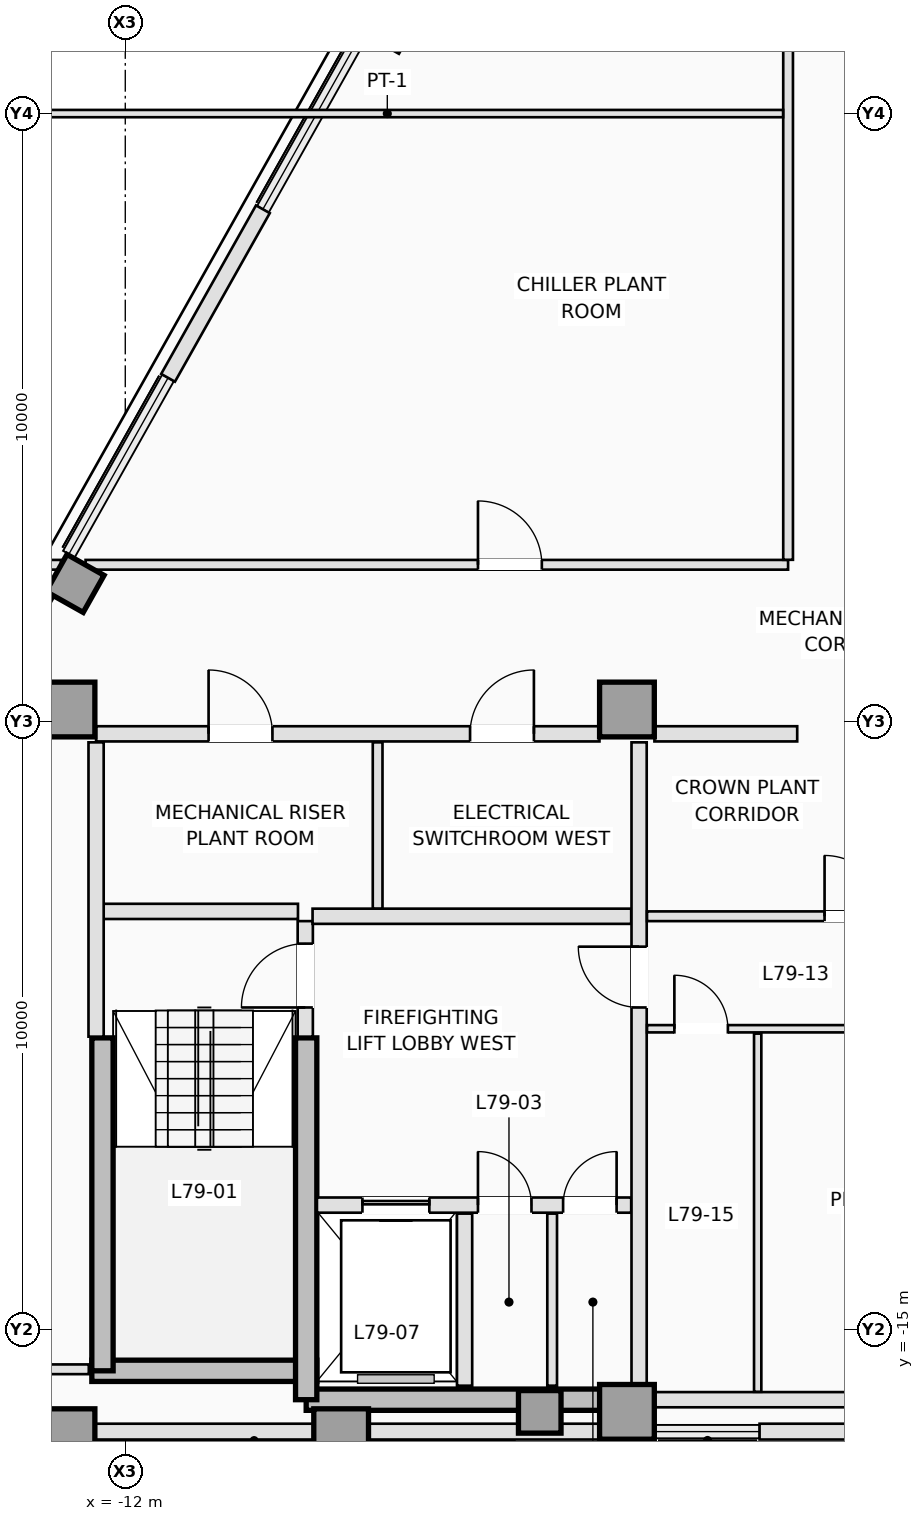
"""IFC4 building model, lengths in metres.
Left out: names, types, materials, properties, quantities, classifications, styles, units other than length and angle.
Written with IfcOpenShell. Run it as: python <this file> out.ifc"""

import sys

from ifc_helpers import new_model, si_unit, direction, frame, frame_2d, origin, origin_2d, place, context, subcontext, project, spatial, rectangle, extrude, element, fill, save


model = new_model("IFC4")
c1 = context("Model", 3, precision=1e-05, world=origin(), true_north=direction((0.0, 1.0)))
c2 = subcontext(c1, "Body", "Model", "MODEL_VIEW")
j1 = project(units=[si_unit("LENGTHUNIT", "METRE"), si_unit("PLANEANGLEUNIT", "RADIAN")], contexts=[c1])
p1 = place(None, origin())
s1 = spatial("IfcSite", under=j1, at=p1, CompositionType="ELEMENT")
p2 = place(p1, origin())
s2 = spatial("IfcBuilding", under=s1, at=p2, CompositionType="ELEMENT")
p3 = place(p2, frame((0.0, 0.0, 283.7)))
s3 = spatial("IfcBuildingStorey", under=s2, at=p3, CompositionType="ELEMENT", Elevation=283.7)
p4 = place(p3, frame((-12.55, -15.675, 0.0), z_axis=(0.0, 0.0, 1.0), x_axis=(1.0, 0.0, 0.0)))
e1 = element("IfcWall", 1, at=p4, inside=s3, PredefinedType="SHEAR", context=c2, shape_type="SweptSolid", body=[
    extrude(rectangle(XDim=3.7, YDim=0.35, at=frame_2d((1.85, 0.0))), origin(), (0.0, 0.0, 1.0), 3.2),
])
p5 = place(p3, frame((-9.025, -16.15, 0.0), z_axis=(0.0, 0.0, 1.0), x_axis=(1.0, 0.0, 0.0)))
e2 = element("IfcWall", 2, at=p5, inside=s3, PredefinedType="SHEAR", context=c2, shape_type="SweptSolid", body=[
    extrude(rectangle(XDim=5.275, YDim=0.35, at=frame_2d((2.637, 0.0))), origin(), (0.0, 0.0, 1.0), 3.2),
])
p6 = place(p3, frame((-12.375, -15.675, 0.0), z_axis=(0.0, 0.0, 1.0), x_axis=(0.0, 1.0, 0.0)))
e3 = element("IfcWall", 3, at=p6, inside=s3, PredefinedType="SHEAR", context=c2, shape_type="SweptSolid", body=[
    extrude(rectangle(XDim=5.475, YDim=0.35, at=frame_2d((2.738, 0.0))), origin(), (0.0, 0.0, 1.0), 3.2),
])
p7 = place(p3, frame((-9.025, -16.15, 0.0), z_axis=(0.0, 0.0, 1.0), x_axis=(0.0, 1.0, 0.0)))
e4 = element("IfcWall", 4, at=p7, inside=s3, PredefinedType="SHEAR", context=c2, shape_type="SweptSolid", body=[
    extrude(rectangle(XDim=5.95, YDim=0.35, at=frame_2d((2.975, 0.0))), origin(), (0.0, 0.0, 1.0), 3.2),
])
for number, where, z_axis, x_axis in (
    (5, (-12.95, -16.75, 0.0), (0.0, 0.0, 1.0), (1.0, 0.0, 0.0)),
    (6, (-8.45, -16.75, 0.0), (0.0, 0.0, 1.0), (1.0, 0.0, 0.0)),
    (7, (-3.75, -16.35, 0.0), (0.0, 0.0, 1.0), (1.0, 0.0, 0.0)),
    (8, (-12.95, -4.8, 0.0), (0.0, 0.0, 1.0), (1.0, 0.0, 0.0)),
    (9, (-3.75, -4.8, 0.0), (0.0, 0.0, 1.0), (1.0, 0.0, 0.0)),
):
    element("IfcColumn", number, at=place(p3, frame(where, z_axis=z_axis, x_axis=x_axis)), inside=s3, PredefinedType="COLUMN", context=c2, shape_type="SweptSolid", body=[
        extrude(rectangle(XDim=0.9, YDim=0.9, at=origin_2d()), origin(), (0.0, 0.0, 1.0), 3.2),
    ])
for number, where, z_axis, x_axis in (
    (10, (-5.184, -16.35, 0.0), (0.0, 0.0, 1.0), (0.0, 1.0, 0.0)),
    (11, (-12.825, -2.727, 0.0), (0.0, 0.0, 1.0), (-0.872, 0.49, 0.0)),
):
    element("IfcColumn", number, at=place(p3, frame(where, z_axis=z_axis, x_axis=x_axis)), inside=s3, PredefinedType="COLUMN", context=c2, shape_type="SweptSolid", body=[
        extrude(rectangle(XDim=0.7, YDim=0.7, at=origin_2d()), origin(), (0.0, 0.0, 1.0), 3.2),
    ])
p8 = place(p3, frame((-4.22, -16.675, 0.0), z_axis=(0.0, 0.0, 1.0), x_axis=(-1.0, 0.0, 0.0)))
e12 = element("IfcWall", 12, at=p8, inside=s3, PredefinedType="STANDARD", context=c2, shape_type="SweptSolid", body=[
    extrude(rectangle(XDim=11.323, YDim=0.26, at=frame_2d((5.661, 0.0))), origin(), (0.0, 0.0, 1.0), 2.234),
])
p9 = place(p3, frame((1.569, -16.675, 0.0), z_axis=(0.0, 0.0, 1.0), x_axis=(-1.0, 0.0, 0.0)))
e13 = element("IfcWall", 13, at=p9, inside=s3, PredefinedType="STANDARD", context=c2, shape_type="SweptSolid", body=[
    extrude(rectangle(XDim=3.138, YDim=0.26, at=frame_2d((1.569, 0.0))), origin(), (0.0, 0.0, 1.0), 2.95),
])
p10 = place(p3, frame((-18.292, -11.781, 0.0), z_axis=(0.0, 0.0, 1.0), x_axis=(0.490270316201, 0.871570431492, 0.0)))
e14 = element("IfcWall", 14, at=p10, inside=s3, PredefinedType="STANDARD", context=c2, shape_type="SweptSolid", body=[
    extrude(rectangle(XDim=10.216, YDim=0.26, at=frame_2d((5.108, 0.0))), origin(), (0.0, 0.0, 1.0), 2.95),
])
p11 = place(p3, frame((-11.296, 0.655, 0.0), z_axis=(0.0, 0.0, 1.0), x_axis=(0.490283106586, 0.871563236602, 0.0)))
e15 = element("IfcWall", 15, at=p11, inside=s3, PredefinedType="STANDARD", context=c2, shape_type="SweptSolid", body=[
    extrude(rectangle(XDim=3.18, YDim=0.26, at=frame_2d((1.59, 0.0))), origin(), (0.0, 0.0, 1.0), 2.95),
])
p12 = place(p3, frame((-9.04, -10.18, 0.0), z_axis=(0.0, 0.0, 1.0), x_axis=(0.0, 1.0, 0.0)))
e16 = element("IfcWall", 16, at=p12, inside=s3, PredefinedType="PARTITIONING", context=c2, shape_type="SweptSolid", body=[
    extrude(rectangle(XDim=1.9, YDim=0.25, at=frame_2d((0.95, 0.0))), origin(), (0.0, 0.0, 1.0), 2.95),
])
p13 = place(p12, frame((0.48, 0.0, 0.0)))
e17 = element("IfcOpeningElement", 17, at=p13, cuts=e16, PredefinedType="OPENING", context=c2, shape_type="SweptSolid", body=[
    extrude(rectangle(XDim=1.05, YDim=2.15, at=frame_2d((0.525, 1.075))), frame((0.0, 0.135, 0.0), z_axis=(0.0, -1.0, 0.0), x_axis=(1.0, 0.0, 0.0)), (0.0, 0.0, 1.0), 0.27),
])
p14 = place(p3, frame((-12.38, -8.12, 0.0), z_axis=(0.0, 0.0, 1.0), x_axis=(1.0, 0.0, 0.0)))
e18 = element("IfcWall", 18, at=p14, inside=s3, PredefinedType="PARTITIONING", context=c2, shape_type="SweptSolid", body=[
    extrude(rectangle(XDim=3.22, YDim=0.25, at=frame_2d((1.61, 0.0))), origin(), (0.0, 0.0, 1.0), 2.95),
])
p15 = place(p3, frame((-12.48, -10.18, 0.0), z_axis=(0.0, 0.0, 1.0), x_axis=(0.0, 1.0, 0.0)))
e19 = element("IfcWall", 19, at=p15, inside=s3, PredefinedType="PARTITIONING", context=c2, shape_type="SweptSolid", body=[
    extrude(rectangle(XDim=4.84, YDim=0.25, at=frame_2d((2.42, 0.0))), origin(), (0.0, 0.0, 1.0), 2.95),
])
p16 = place(p3, frame((-8.848, -12.95, 0.0), z_axis=(0.0, 0.0, 1.0), x_axis=(1.0, 0.0, 0.0)))
e20 = element("IfcWall", 20, at=p16, inside=s3, PredefinedType="PARTITIONING", context=c2, shape_type="SweptSolid", body=[
    extrude(rectangle(XDim=5.168, YDim=0.25, at=frame_2d((2.584, 0.0))), origin(), (0.0, 0.0, 1.0), 2.95),
])
p17 = place(p16, frame((0.748, 0.0, 0.0)))
e21 = element("IfcOpeningElement", 21, at=p17, cuts=e20, PredefinedType="OPENING", context=c2, shape_type="SweptSolid", body=[
    extrude(rectangle(XDim=1.1, YDim=2.15, at=frame_2d((0.55, 1.075))), frame((0.0, 0.135, 0.0), z_axis=(0.0, -1.0, 0.0), x_axis=(1.0, 0.0, 0.0)), (0.0, 0.0, 1.0), 0.27),
])
p18 = place(p16, frame((2.648, 0.0, 0.0)))
e22 = element("IfcOpeningElement", 22, at=p18, cuts=e20, PredefinedType="OPENING", context=c2, shape_type="SweptSolid", body=[
    extrude(rectangle(XDim=0.88, YDim=2.1, at=frame_2d((0.44, 1.05))), frame((0.0, 0.135, 0.0), z_axis=(0.0, -1.0, 0.0), x_axis=(1.0, 0.0, 0.0)), (0.0, 0.0, 1.0), 0.27),
])
p19 = place(p16, frame((4.048, 0.0, 0.0)))
e23 = element("IfcOpeningElement", 23, at=p19, cuts=e20, PredefinedType="OPENING", context=c2, shape_type="SweptSolid", body=[
    extrude(rectangle(XDim=0.88, YDim=2.1, at=frame_2d((0.44, 1.05))), frame((0.0, 0.135, 0.0), z_axis=(0.0, -1.0, 0.0), x_axis=(1.0, 0.0, 0.0)), (0.0, 0.0, 1.0), 0.27),
])
p20 = place(p3, frame((-6.42, -15.92, 0.0), z_axis=(0.0, 0.0, 1.0), x_axis=(0.0, 1.0, 0.0)))
e24 = element("IfcWall", 24, at=p20, inside=s3, PredefinedType="PARTITIONING", context=c2, shape_type="SweptSolid", body=[
    extrude(rectangle(XDim=2.83, YDim=0.25, at=frame_2d((1.415, 0.0))), origin(), (0.0, 0.0, 1.0), 2.95),
])
p21 = place(p3, frame((-4.98, -15.92, 0.0), z_axis=(0.0, 0.0, 1.0), x_axis=(0.0, 1.0, 0.0)))
e25 = element("IfcWall", 25, at=p21, inside=s3, PredefinedType="PARTITIONING", context=c2, shape_type="SweptSolid", body=[
    extrude(rectangle(XDim=2.83, YDim=0.16, at=frame_2d((1.415, 0.0))), origin(), (0.0, 0.0, 1.0), 2.95),
])
p22 = place(p3, frame((-8.92, -8.2, 0.0), z_axis=(0.0, 0.0, 1.0), x_axis=(1.0, 0.0, 0.0)))
e26 = element("IfcWall", 26, at=p22, inside=s3, PredefinedType="PARTITIONING", context=c2, shape_type="SweptSolid", body=[
    extrude(rectangle(XDim=5.24, YDim=0.25, at=frame_2d((2.62, 0.0))), origin(), (0.0, 0.0, 1.0), 2.95),
])
p23 = place(p3, frame((-3.55, -15.898, 0.0), z_axis=(0.0, 0.0, 1.0), x_axis=(0.0, 1.0, 0.0)))
e27 = element("IfcWall", 27, at=p23, inside=s3, PredefinedType="PARTITIONING", context=c2, shape_type="SweptSolid", body=[
    extrude(rectangle(XDim=10.558, YDim=0.25, at=frame_2d((5.279, 0.0))), origin(), (0.0, 0.0, 1.0), 2.95),
])
p24 = place(p23, frame((6.198, 0.0, 0.0)))
e28 = element("IfcOpeningElement", 28, at=p24, cuts=e27, PredefinedType="OPENING", context=c2, shape_type="SweptSolid", body=[
    extrude(rectangle(XDim=1.0, YDim=2.15, at=frame_2d((0.5, 1.075))), frame((0.0, 0.135, 0.0), z_axis=(0.0, -1.0, 0.0), x_axis=(1.0, 0.0, 0.0)), (0.0, 0.0, 1.0), 0.27),
])
p25 = place(p3, frame((-12.48, -5.2, 0.0), z_axis=(0.0, 0.0, 1.0), x_axis=(1.0, 0.0, 0.0)))
e29 = element("IfcWall", 29, at=p25, inside=s3, PredefinedType="PARTITIONING", context=c2, shape_type="SweptSolid", body=[
    extrude(rectangle(XDim=8.278, YDim=0.25, at=frame_2d((4.139, 0.0))), origin(), (0.0, 0.0, 1.0), 2.95),
])
p26 = place(p25, frame((1.85, 0.0, 0.0)))
e30 = element("IfcOpeningElement", 30, at=p26, cuts=e29, PredefinedType="OPENING", context=c2, shape_type="SweptSolid", body=[
    extrude(rectangle(XDim=1.05, YDim=2.12, at=frame_2d((0.525, 1.06))), frame((0.0, 0.135, 0.0), z_axis=(0.0, -1.0, 0.0), x_axis=(1.0, 0.0, 0.0)), (0.0, 0.0, 1.0), 0.27),
])
p27 = place(p25, frame((6.15, 0.0, 0.0)))
e31 = element("IfcOpeningElement", 31, at=p27, cuts=e29, PredefinedType="OPENING", context=c2, shape_type="SweptSolid", body=[
    extrude(rectangle(XDim=1.05, YDim=2.12, at=frame_2d((0.525, 1.06))), frame((0.0, 0.135, 0.0), z_axis=(0.0, -1.0, 0.0), x_axis=(1.0, 0.0, 0.0)), (0.0, 0.0, 1.0), 0.27),
])
p28 = place(p3, frame((-3.298, -5.2, 0.0), z_axis=(0.0, 0.0, 1.0), x_axis=(1.0, 0.0, 0.0)))
e32 = element("IfcWall", 32, at=p28, inside=s3, PredefinedType="PARTITIONING", context=c2, shape_type="SweptSolid", body=[
    extrude(rectangle(XDim=2.348, YDim=0.25, at=frame_2d((1.174, 0.0))), origin(), (0.0, 0.0, 1.0), 2.95),
])
p29 = place(p3, frame((-7.85, -8.073, 0.0), z_axis=(0.0, 0.0, 1.0), x_axis=(0.0, 1.0, 0.0)))
e33 = element("IfcWall", 33, at=p29, inside=s3, PredefinedType="PARTITIONING", context=c2, shape_type="SweptSolid", body=[
    extrude(rectangle(XDim=2.733, YDim=0.16, at=frame_2d((1.366, 0.0))), origin(), (0.0, 0.0, 1.0), 2.95),
])
p30 = place(p3, frame((-3.298, -16.15, 0.0), z_axis=(0.0, 0.0, 1.0), x_axis=(1.0, 0.0, 0.0)))
e34 = element("IfcWall", 34, at=p30, inside=s3, PredefinedType="PARTITIONING", context=c2, shape_type="SweptSolid", body=[
    extrude(rectangle(XDim=6.596, YDim=0.25, at=frame_2d((3.298, 0.0))), origin(), (0.0, 0.0, 1.0), 2.544),
])
p31 = place(p3, frame((-3.42, -8.2, 0.0), z_axis=(0.0, 0.0, 1.0), x_axis=(1.0, 0.0, 0.0)))
e35 = element("IfcWall", 35, at=p31, inside=s3, PredefinedType="PARTITIONING", context=c2, shape_type="SweptSolid", body=[
    extrude(rectangle(XDim=6.84, YDim=0.16, at=frame_2d((3.42, 0.0))), origin(), (0.0, 0.0, 1.0), 2.95),
])
p32 = place(p31, frame((2.92, 0.0, 0.0)))
e36 = element("IfcOpeningElement", 36, at=p32, cuts=e35, PredefinedType="OPENING", context=c2, shape_type="SweptSolid", body=[
    extrude(rectangle(XDim=1.0, YDim=2.15, at=frame_2d((0.5, 1.075))), frame((0.0, 0.09, 0.0), z_axis=(0.0, -1.0, 0.0), x_axis=(1.0, 0.0, 0.0)), (0.0, 0.0, 1.0), 0.18),
])
p33 = place(p3, frame((-3.42, -10.05, 0.0), z_axis=(0.0, 0.0, 1.0), x_axis=(1.0, 0.0, 0.0)))
e37 = element("IfcWall", 37, at=p33, inside=s3, PredefinedType="PARTITIONING", context=c2, shape_type="SweptSolid", body=[
    extrude(rectangle(XDim=6.84, YDim=0.12, at=frame_2d((3.42, 0.0))), origin(), (0.0, 0.0, 1.0), 2.95),
])
p34 = place(p33, frame((0.45, 0.0, 0.0)))
e38 = element("IfcOpeningElement", 38, at=p34, cuts=e37, PredefinedType="OPENING", context=c2, shape_type="SweptSolid", body=[
    extrude(rectangle(XDim=0.88, YDim=2.12, at=frame_2d((0.44, 1.06))), frame((0.0, 0.07, 0.0), z_axis=(0.0, -1.0, 0.0), x_axis=(1.0, 0.0, 0.0)), (0.0, 0.0, 1.0), 0.14),
])
p35 = place(p33, frame((3.6, 0.0, 0.0)))
e39 = element("IfcOpeningElement", 39, at=p35, cuts=e37, PredefinedType="OPENING", context=c2, shape_type="SweptSolid", body=[
    extrude(rectangle(XDim=0.92, YDim=2.12, at=frame_2d((0.46, 1.06))), frame((0.0, 0.07, 0.0), z_axis=(0.0, -1.0, 0.0), x_axis=(1.0, 0.0, 0.0)), (0.0, 0.0, 1.0), 0.14),
])
p36 = place(p3, frame((-1.6, -16.02, 0.0), z_axis=(0.0, 0.0, 1.0), x_axis=(0.0, 1.0, 0.0)))
e40 = element("IfcWall", 40, at=p36, inside=s3, PredefinedType="PARTITIONING", context=c2, shape_type="SweptSolid", body=[
    extrude(rectangle(XDim=5.89, YDim=0.12, at=frame_2d((2.945, 0.0))), origin(), (0.0, 0.0, 1.0), 2.95),
])
p37 = place(p3, frame((-15.743, -15.65, 0.0), z_axis=(0.0, 0.0, 1.0), x_axis=(1.0, 0.0, 0.0)))
e41 = element("IfcWall", 41, at=p37, inside=s3, PredefinedType="PARTITIONING", context=c2, shape_type="SweptSolid", body=[
    extrude(rectangle(XDim=3.143, YDim=0.16, at=frame_2d((1.571, 0.0))), origin(), (0.0, 0.0, 1.0), 2.95),
])
p38 = place(p3, frame((-15.8, -2.42, 0.0), z_axis=(0.0, 0.0, 1.0), x_axis=(1.0, 0.0, 0.0)))
e42 = element("IfcWall", 42, at=p38, inside=s3, PredefinedType="PARTITIONING", context=c2, shape_type="SweptSolid", body=[
    extrude(rectangle(XDim=2.743, YDim=0.16, at=frame_2d((1.372, 0.0))), origin(), (0.0, 0.0, 1.0), 2.95),
])
p39 = place(p3, frame((-12.653, -2.42, 0.0), z_axis=(0.0, 0.0, 1.0), x_axis=(1.0, 0.0, 0.0)))
e43 = element("IfcWall", 43, at=p39, inside=s3, PredefinedType="PARTITIONING", context=c2, shape_type="SweptSolid", body=[
    extrude(rectangle(XDim=11.553, YDim=0.16, at=frame_2d((5.776, 0.0))), origin(), (0.0, 0.0, 1.0), 2.95),
])
p40 = place(p39, frame((6.453, 0.0, 0.0)))
e44 = element("IfcOpeningElement", 44, at=p40, cuts=e43, PredefinedType="OPENING", context=c2, shape_type="SweptSolid", body=[
    extrude(rectangle(XDim=1.05, YDim=2.12, at=frame_2d((0.525, 1.06))), frame((0.0, 0.09, 0.0), z_axis=(0.0, -1.0, 0.0), x_axis=(1.0, 0.0, 0.0)), (0.0, 0.0, 1.0), 0.18),
])
p41 = place(p3, frame((-1.1, -2.338, 0.0), z_axis=(0.0, 0.0, 1.0), x_axis=(0.0, 1.0, 0.0)))
e45 = element("IfcWall", 45, at=p41, inside=s3, PredefinedType="PARTITIONING", context=c2, shape_type="SweptSolid", body=[
    extrude(rectangle(XDim=13.938, YDim=0.16, at=frame_2d((6.969, 0.0))), origin(), (0.0, 0.0, 1.0), 2.95),
])
p42 = place(p41, frame((8.538, 0.0, 0.0)))
e46 = element("IfcOpeningElement", 46, at=p42, cuts=e45, PredefinedType="OPENING", context=c2, shape_type="SweptSolid", body=[
    extrude(rectangle(XDim=1.05, YDim=2.12, at=frame_2d((0.525, 1.06))), frame((0.0, 0.09, 0.0), z_axis=(0.0, -1.0, 0.0), x_axis=(1.0, 0.0, 0.0)), (0.0, 0.0, 1.0), 0.18),
])
p43 = place(p3, frame((-14.2, 5.0, 0.0), z_axis=(0.0, 0.0, 1.0), x_axis=(1.0, 0.0, 0.0)))
e47 = element("IfcWall", 47, at=p43, inside=s3, PredefinedType="PARTITIONING", context=c2, shape_type="SweptSolid", body=[
    extrude(rectangle(XDim=13.018, YDim=0.12, at=frame_2d((6.509, 0.0))), origin(), (0.0, 0.0, 1.0), 2.95),
])
p44 = place(p17, origin())
e48 = element("IfcDoor", 48, at=p44, inside=s3, OperationType="SLIDING_TO_LEFT", PredefinedType="DOOR", context=c2, shape_type="SweptSolid", body=[
    extrude(rectangle(XDim=1.1, YDim=2.15, at=frame_2d((0.55, 1.075))), frame((0.0, 0.025, 0.0), z_axis=(0.0, -1.0, 0.0), x_axis=(1.0, 0.0, 0.0)), (0.0, 0.0, 1.0), 0.05),
])
fill(e21, e48)
p45 = place(p13, origin())
e49 = element("IfcDoor", 49, at=p45, inside=s3, OperationType="SINGLE_SWING_LEFT", PredefinedType="DOOR", context=c2, shape_type="SweptSolid", body=[
    extrude(rectangle(XDim=1.05, YDim=2.15, at=frame_2d((0.525, 1.075))), frame((0.0, 0.025, 0.0), z_axis=(0.0, -1.0, 0.0), x_axis=(1.0, 0.0, 0.0)), (0.0, 0.0, 1.0), 0.05),
])
fill(e17, e49)
p46 = place(p18, origin())
e50 = element("IfcDoor", 50, at=p46, inside=s3, OperationType="SINGLE_SWING_LEFT", PredefinedType="TRAPDOOR", context=c2, shape_type="SweptSolid", body=[
    extrude(rectangle(XDim=0.88, YDim=2.1, at=frame_2d((0.44, 1.05))), frame((0.0, 0.025, 0.0), z_axis=(0.0, -1.0, 0.0), x_axis=(1.0, 0.0, 0.0)), (0.0, 0.0, 1.0), 0.05),
])
fill(e22, e50)
p47 = place(p19, origin())
e51 = element("IfcDoor", 51, at=p47, inside=s3, OperationType="SINGLE_SWING_RIGHT", PredefinedType="TRAPDOOR", context=c2, shape_type="SweptSolid", body=[
    extrude(rectangle(XDim=0.88, YDim=2.1, at=frame_2d((0.44, 1.05))), frame((0.0, 0.025, 0.0), z_axis=(0.0, -1.0, 0.0), x_axis=(1.0, 0.0, 0.0)), (0.0, 0.0, 1.0), 0.05),
])
fill(e23, e51)
p48 = place(p24, origin())
e52 = element("IfcDoor", 52, at=p48, inside=s3, OperationType="SINGLE_SWING_RIGHT", PredefinedType="DOOR", context=c2, shape_type="SweptSolid", body=[
    extrude(rectangle(XDim=1.0, YDim=2.15, at=frame_2d((0.5, 1.075))), frame((0.0, 0.025, 0.0), z_axis=(0.0, -1.0, 0.0), x_axis=(1.0, 0.0, 0.0)), (0.0, 0.0, 1.0), 0.05),
])
fill(e28, e52)
p49 = place(p26, origin())
e53 = element("IfcDoor", 53, at=p49, inside=s3, OperationType="SINGLE_SWING_LEFT", PredefinedType="DOOR", context=c2, shape_type="SweptSolid", body=[
    extrude(rectangle(XDim=1.05, YDim=2.12, at=frame_2d((0.525, 1.06))), frame((0.0, 0.025, 0.0), z_axis=(0.0, -1.0, 0.0), x_axis=(1.0, 0.0, 0.0)), (0.0, 0.0, 1.0), 0.05),
])
fill(e30, e53)
p50 = place(p27, origin())
e54 = element("IfcDoor", 54, at=p50, inside=s3, OperationType="SINGLE_SWING_RIGHT", PredefinedType="DOOR", context=c2, shape_type="SweptSolid", body=[
    extrude(rectangle(XDim=1.05, YDim=2.12, at=frame_2d((0.525, 1.06))), frame((0.0, 0.025, 0.0), z_axis=(0.0, -1.0, 0.0), x_axis=(1.0, 0.0, 0.0)), (0.0, 0.0, 1.0), 0.05),
])
fill(e31, e54)
p51 = place(p32, origin())
e55 = element("IfcDoor", 55, at=p51, inside=s3, OperationType="SINGLE_SWING_LEFT", PredefinedType="DOOR", context=c2, shape_type="SweptSolid", body=[
    extrude(rectangle(XDim=1.0, YDim=2.15, at=frame_2d((0.5, 1.075))), frame((0.0, 0.025, 0.0), z_axis=(0.0, -1.0, 0.0), x_axis=(1.0, 0.0, 0.0)), (0.0, 0.0, 1.0), 0.05),
])
fill(e36, e55)
p52 = place(p34, origin())
e56 = element("IfcDoor", 56, at=p52, inside=s3, OperationType="SINGLE_SWING_LEFT", PredefinedType="DOOR", context=c2, shape_type="SweptSolid", body=[
    extrude(rectangle(XDim=0.88, YDim=2.12, at=frame_2d((0.44, 1.06))), frame((0.0, 0.025, 0.0), z_axis=(0.0, -1.0, 0.0), x_axis=(1.0, 0.0, 0.0)), (0.0, 0.0, 1.0), 0.05),
])
fill(e38, e56)
p53 = place(p40, origin())
e57 = element("IfcDoor", 57, at=p53, inside=s3, OperationType="SINGLE_SWING_LEFT", PredefinedType="DOOR", context=c2, shape_type="SweptSolid", body=[
    extrude(rectangle(XDim=1.05, YDim=2.12, at=frame_2d((0.525, 1.06))), frame((0.0, 0.025, 0.0), z_axis=(0.0, -1.0, 0.0), x_axis=(1.0, 0.0, 0.0)), (0.0, 0.0, 1.0), 0.05),
])
fill(e44, e57)
save(model, sys.argv[1])
